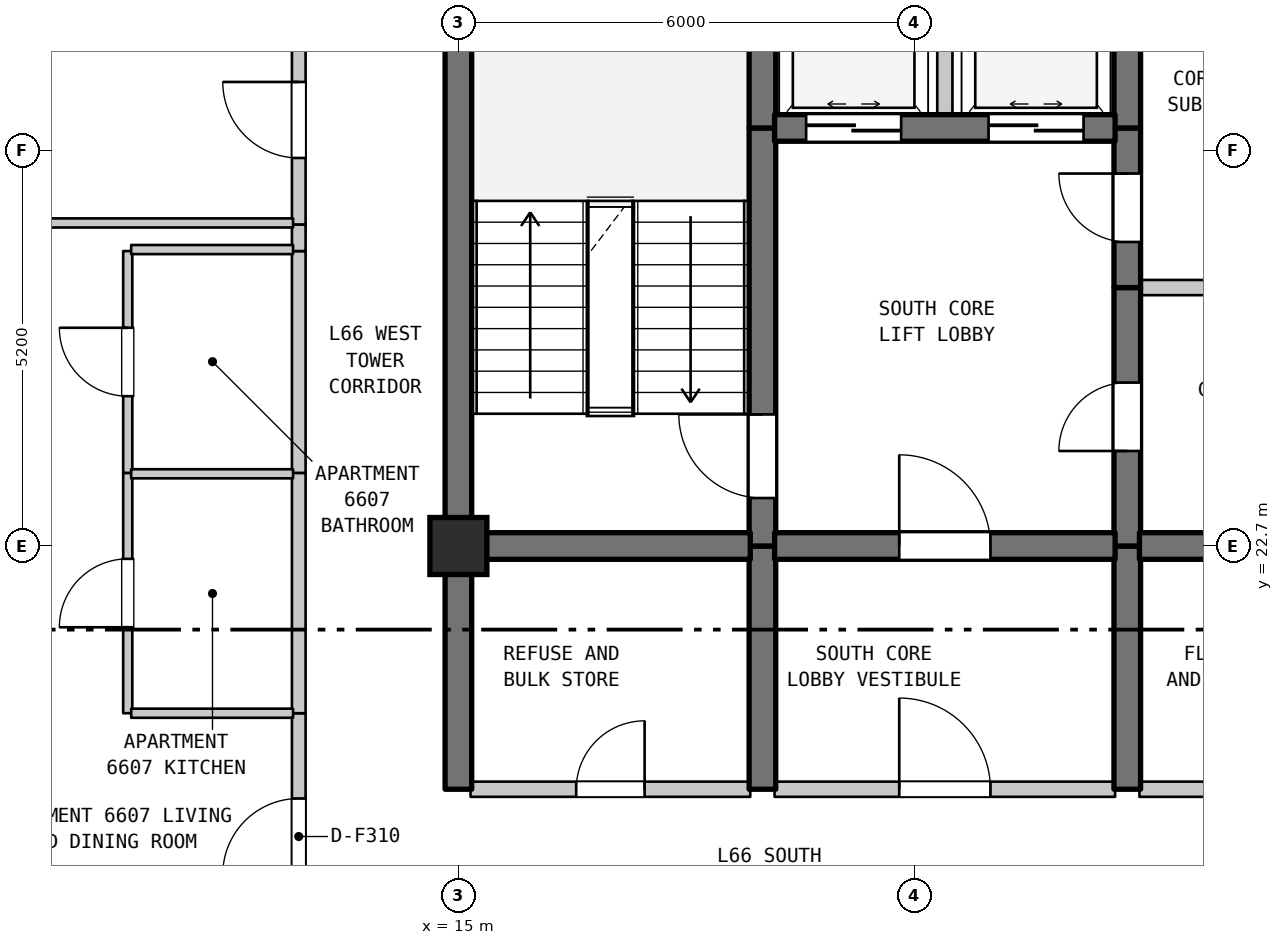
"""IFC4 building model, lengths in metres.
Left out: names, types, materials, properties, quantities, classifications, styles, units other than length and angle.
Written with IfcOpenShell. Run it as: python <this file> out.ifc"""

import sys

from ifc_helpers import new_model, si_unit, direction, frame, frame_2d, origin, origin_2d, place, context, subcontext, project, spatial, rectangle, extrude, element, fill, save


model = new_model("IFC4")
c1 = context("Model", 3, precision=1e-05, world=origin(), true_north=direction((0.0, 1.0)))
c2 = subcontext(c1, "Body", "Model", "MODEL_VIEW")
j1 = project(units=[si_unit("LENGTHUNIT", "METRE"), si_unit("PLANEANGLEUNIT", "RADIAN")], contexts=[c1])
p1 = place(None, origin())
s1 = spatial("IfcSite", under=j1, at=p1, CompositionType="ELEMENT")
p2 = place(p1, origin())
s2 = spatial("IfcBuilding", under=s1, at=p2, CompositionType="ELEMENT")
p3 = place(p2, frame((0.0, 0.0, 265.8)))
s3 = spatial("IfcBuildingStorey", under=s2, at=p3, CompositionType="ELEMENT", Elevation=265.8)
p4 = place(p3, frame((15.0, 22.7, 0.0), z_axis=(0.0, 0.0, 1.0), x_axis=(1.0, 0.0, 0.0)))
e1 = element("IfcColumn", 1, at=p4, inside=s3, PredefinedType="COLUMN", context=c2, shape_type="SweptSolid", body=[
    extrude(rectangle(XDim=0.75, YDim=0.75, at=origin_2d()), origin(), (0.0, 0.0, 1.0), 3.7),
])
p5 = place(p3, frame((10.65, 20.5, 0.0), z_axis=(0.0, 0.0, 1.0), x_axis=(0.0, 1.0, 0.0)))
e2 = element("IfcWall", 2, at=p5, inside=s3, PredefinedType="PARTITIONING", context=c2, shape_type="SweptSolid", body=[
    extrude(rectangle(XDim=3.162, YDim=0.12, at=frame_2d((1.581, 0.0))), origin(), (0.0, 0.0, 1.0), 3.39),
])
p6 = place(p5, frame((1.131, 0.0, 0.0)))
e3 = element("IfcOpeningElement", 3, at=p6, cuts=e2, PredefinedType="OPENING", context=c2, shape_type="SweptSolid", body=[
    extrude(rectangle(XDim=0.9, YDim=2.15, at=frame_2d((0.45, 1.075))), frame((0.0, 0.07, 0.0), z_axis=(0.0, -1.0, 0.0), x_axis=(1.0, 0.0, 0.0)), (0.0, 0.0, 1.0), 0.14),
])
p7 = place(p3, frame((10.65, 23.662, 0.0), z_axis=(0.0, 0.0, 1.0), x_axis=(0.0, 1.0, 0.0)))
e4 = element("IfcWall", 4, at=p7, inside=s3, PredefinedType="PARTITIONING", context=c2, shape_type="SweptSolid", body=[
    extrude(rectangle(XDim=2.918, YDim=0.12, at=frame_2d((1.459, 0.0))), origin(), (0.0, 0.0, 1.0), 3.39),
])
p8 = place(p7, frame((1.009, 0.0, 0.0)))
e5 = element("IfcOpeningElement", 5, at=p8, cuts=e4, PredefinedType="OPENING", context=c2, shape_type="SweptSolid", body=[
    extrude(rectangle(XDim=0.9, YDim=2.1, at=frame_2d((0.45, 1.05))), frame((0.0, 0.07, 0.0), z_axis=(0.0, -1.0, 0.0), x_axis=(1.0, 0.0, 0.0)), (0.0, 0.0, 1.0), 0.14),
])
p9 = place(p3, frame((12.9, 17.4, 0.0), z_axis=(0.0, 0.0, 1.0), x_axis=(0.0, 1.0, 0.0)))
e6 = element("IfcWall", 6, at=p9, inside=s3, PredefinedType="STANDARD", context=c2, shape_type="SweptSolid", body=[
    extrude(rectangle(XDim=3.1, YDim=0.18, at=frame_2d((1.55, 0.0))), origin(), (0.0, 0.0, 1.0), 3.39),
])
p10 = place(p9, frame((0.978, 0.0, 0.0)))
e7 = element("IfcOpeningElement", 7, at=p10, cuts=e6, PredefinedType="OPENING", context=c2, shape_type="SweptSolid", body=[
    extrude(rectangle(XDim=1.0, YDim=2.15, at=frame_2d((0.5, 1.075))), frame((0.0, 0.1, 0.0), z_axis=(0.0, -1.0, 0.0), x_axis=(1.0, 0.0, 0.0)), (0.0, 0.0, 1.0), 0.2),
])
p11 = place(p3, frame((12.9, 20.5, 0.0), z_axis=(0.0, 0.0, 1.0), x_axis=(0.0, 1.0, 0.0)))
e8 = element("IfcWall", 8, at=p11, inside=s3, PredefinedType="STANDARD", context=c2, shape_type="SweptSolid", body=[
    extrude(rectangle(XDim=3.162, YDim=0.18, at=frame_2d((1.581, 0.0))), origin(), (0.0, 0.0, 1.0), 3.39),
])
p12 = place(p3, frame((12.9, 23.662, 0.0), z_axis=(0.0, 0.0, 1.0), x_axis=(0.0, 1.0, 0.0)))
e9 = element("IfcWall", 9, at=p12, inside=s3, PredefinedType="STANDARD", context=c2, shape_type="SweptSolid", body=[
    extrude(rectangle(XDim=2.918, YDim=0.18, at=frame_2d((1.459, 0.0))), origin(), (0.0, 0.0, 1.0), 3.39),
])
p13 = place(p3, frame((12.9, 26.58, 0.0), z_axis=(0.0, 0.0, 1.0), x_axis=(0.0, 1.0, 0.0)))
e10 = element("IfcWall", 10, at=p13, inside=s3, PredefinedType="STANDARD", context=c2, shape_type="SweptSolid", body=[
    extrude(rectangle(XDim=0.35, YDim=0.18, at=frame_2d((0.175, 0.0))), origin(), (0.0, 0.0, 1.0), 3.39),
])
p14 = place(p3, frame((12.9, 26.93, 0.0), z_axis=(0.0, 0.0, 1.0), x_axis=(0.0, 1.0, 0.0)))
e11 = element("IfcWall", 11, at=p14, inside=s3, PredefinedType="STANDARD", context=c2, shape_type="SweptSolid", body=[
    extrude(rectangle(XDim=2.75, YDim=0.18, at=frame_2d((1.375, 0.0))), origin(), (0.0, 0.0, 1.0), 3.39),
])
p15 = place(p14, frame((0.875, 0.0, 0.0)))
e12 = element("IfcOpeningElement", 12, at=p15, cuts=e11, PredefinedType="OPENING", context=c2, shape_type="SweptSolid", body=[
    extrude(rectangle(XDim=1.0, YDim=2.15, at=frame_2d((0.5, 1.075))), frame((0.0, 0.1, 0.0), z_axis=(0.0, -1.0, 0.0), x_axis=(1.0, 0.0, 0.0)), (0.0, 0.0, 1.0), 0.2),
])
p16 = place(p3, frame((15.0, 19.5, 0.0), z_axis=(0.0, 0.0, 1.0), x_axis=(0.0, 1.0, 0.0)))
e13 = element("IfcWall", 13, at=p16, inside=s3, PredefinedType="SHEAR", context=c2, shape_type="SweptSolid", body=[
    extrude(rectangle(XDim=3.2, YDim=0.35, at=frame_2d((1.6, 0.0))), origin(), (0.0, 0.0, 1.0), 3.39),
])
p17 = place(p3, frame((15.0, 22.7, 0.0), z_axis=(0.0, 0.0, 1.0), x_axis=(0.0, 1.0, 0.0)))
e14 = element("IfcWall", 14, at=p17, inside=s3, PredefinedType="SHEAR", context=c2, shape_type="SweptSolid", body=[
    extrude(rectangle(XDim=6.8, YDim=0.35, at=frame_2d((3.4, 0.0))), origin(), (0.0, 0.0, 1.0), 3.39),
])
p18 = place(p3, frame((19.0, 19.5, 0.0), z_axis=(0.0, 0.0, 1.0), x_axis=(0.0, 1.0, 0.0)))
e15 = element("IfcWall", 15, at=p18, inside=s3, PredefinedType="SHEAR", context=c2, shape_type="SweptSolid", body=[
    extrude(rectangle(XDim=3.2, YDim=0.35, at=frame_2d((1.6, 0.0))), origin(), (0.0, 0.0, 1.0), 3.39),
])
p19 = place(p3, frame((19.0, 22.7, 0.0), z_axis=(0.0, 0.0, 1.0), x_axis=(0.0, 1.0, 0.0)))
e16 = element("IfcWall", 16, at=p19, inside=s3, PredefinedType="SHEAR", context=c2, shape_type="SweptSolid", body=[
    extrude(rectangle(XDim=5.5, YDim=0.35, at=frame_2d((2.75, 0.0))), origin(), (0.0, 0.0, 1.0), 3.39),
])
p20 = place(p19, frame((0.631, 0.0, 0.0)))
e17 = element("IfcOpeningElement", 17, at=p20, cuts=e16, PredefinedType="OPENING", context=c2, shape_type="SweptSolid", body=[
    extrude(rectangle(XDim=1.1, YDim=2.15, at=frame_2d((0.55, 1.075))), frame((0.0, 0.185, 0.0), z_axis=(0.0, -1.0, 0.0), x_axis=(1.0, 0.0, 0.0)), (0.0, 0.0, 1.0), 0.37),
])
p21 = place(p3, frame((19.0, 28.2, 0.0), z_axis=(0.0, 0.0, 1.0), x_axis=(0.0, 1.0, 0.0)))
e18 = element("IfcWall", 18, at=p21, inside=s3, PredefinedType="SHEAR", context=c2, shape_type="SweptSolid", body=[
    extrude(rectangle(XDim=1.3, YDim=0.35, at=frame_2d((0.65, 0.0))), origin(), (0.0, 0.0, 1.0), 3.39),
])
p22 = place(p3, frame((21.4, 28.2, 0.0), z_axis=(0.0, 0.0, 1.0), x_axis=(0.0, 1.0, 0.0)))
e19 = element("IfcWall", 19, at=p22, inside=s3, PredefinedType="STANDARD", context=c2, shape_type="SweptSolid", body=[
    extrude(rectangle(XDim=2.6, YDim=0.2, at=frame_2d((1.3, 0.0))), origin(), (0.0, 0.0, 1.0), 3.39),
])
p23 = place(p3, frame((23.8, 19.5, 0.0), z_axis=(0.0, 0.0, 1.0), x_axis=(0.0, 1.0, 0.0)))
e20 = element("IfcWall", 20, at=p23, inside=s3, PredefinedType="SHEAR", context=c2, shape_type="SweptSolid", body=[
    extrude(rectangle(XDim=3.2, YDim=0.35, at=frame_2d((1.6, 0.0))), origin(), (0.0, 0.0, 1.0), 3.39),
])
p24 = place(p3, frame((23.8, 22.7, 0.0), z_axis=(0.0, 0.0, 1.0), x_axis=(0.0, 1.0, 0.0)))
e21 = element("IfcWall", 21, at=p24, inside=s3, PredefinedType="SHEAR", context=c2, shape_type="SweptSolid", body=[
    extrude(rectangle(XDim=3.4, YDim=0.35, at=frame_2d((1.7, 0.0))), origin(), (0.0, 0.0, 1.0), 3.39),
])
p25 = place(p24, frame((1.25, 0.0, 0.0)))
e22 = element("IfcOpeningElement", 22, at=p25, cuts=e21, PredefinedType="OPENING", context=c2, shape_type="SweptSolid", body=[
    extrude(rectangle(XDim=0.9, YDim=2.15, at=frame_2d((0.45, 1.075))), frame((0.0, 0.185, 0.0), z_axis=(0.0, -1.0, 0.0), x_axis=(1.0, 0.0, 0.0)), (0.0, 0.0, 1.0), 0.37),
])
p26 = place(p3, frame((23.8, 26.1, 0.0), z_axis=(0.0, 0.0, 1.0), x_axis=(0.0, 1.0, 0.0)))
e23 = element("IfcWall", 23, at=p26, inside=s3, PredefinedType="SHEAR", context=c2, shape_type="SweptSolid", body=[
    extrude(rectangle(XDim=2.1, YDim=0.35, at=frame_2d((1.05, 0.0))), origin(), (0.0, 0.0, 1.0), 3.39),
])
p27 = place(p26, frame((0.6, 0.0, 0.0)))
e24 = element("IfcOpeningElement", 24, at=p27, cuts=e23, PredefinedType="OPENING", context=c2, shape_type="SweptSolid", body=[
    extrude(rectangle(XDim=0.9, YDim=2.15, at=frame_2d((0.45, 1.075))), frame((0.0, 0.185, 0.0), z_axis=(0.0, -1.0, 0.0), x_axis=(1.0, 0.0, 0.0)), (0.0, 0.0, 1.0), 0.37),
])
p28 = place(p3, frame((23.8, 28.2, 0.0), z_axis=(0.0, 0.0, 1.0), x_axis=(0.0, 1.0, 0.0)))
e25 = element("IfcWall", 25, at=p28, inside=s3, PredefinedType="SHEAR", context=c2, shape_type="SweptSolid", body=[
    extrude(rectangle(XDim=2.6, YDim=0.35, at=frame_2d((1.3, 0.0))), origin(), (0.0, 0.0, 1.0), 3.39),
])
p29 = place(p3, frame((15.16, 19.5, 0.0), z_axis=(0.0, 0.0, 1.0), x_axis=(1.0, 0.0, 0.0)))
e26 = element("IfcWall", 26, at=p29, inside=s3, PredefinedType="STANDARD", context=c2, shape_type="SweptSolid", body=[
    extrude(rectangle(XDim=3.68, YDim=0.2, at=frame_2d((1.84, 0.0))), origin(), (0.0, 0.0, 1.0), 3.39),
])
p30 = place(p29, frame((1.39, 0.0, 0.0)))
e27 = element("IfcOpeningElement", 27, at=p30, cuts=e26, PredefinedType="OPENING", context=c2, shape_type="SweptSolid", body=[
    extrude(rectangle(XDim=0.9, YDim=2.15, at=frame_2d((0.45, 1.075))), frame((0.0, 0.11, 0.0), z_axis=(0.0, -1.0, 0.0), x_axis=(1.0, 0.0, 0.0)), (0.0, 0.0, 1.0), 0.22),
])
p31 = place(p3, frame((19.16, 19.5, 0.0), z_axis=(0.0, 0.0, 1.0), x_axis=(1.0, 0.0, 0.0)))
e28 = element("IfcWall", 28, at=p31, inside=s3, PredefinedType="STANDARD", context=c2, shape_type="SweptSolid", body=[
    extrude(rectangle(XDim=4.48, YDim=0.2, at=frame_2d((2.24, 0.0))), origin(), (0.0, 0.0, 1.0), 3.39),
])
p32 = place(p31, frame((1.64, 0.0, 0.0)))
e29 = element("IfcOpeningElement", 29, at=p32, cuts=e28, PredefinedType="OPENING", context=c2, shape_type="SweptSolid", body=[
    extrude(rectangle(XDim=1.2, YDim=2.2, at=frame_2d((0.6, 1.1))), frame((0.0, 0.11, 0.0), z_axis=(0.0, -1.0, 0.0), x_axis=(1.0, 0.0, 0.0)), (0.0, 0.0, 1.0), 0.22),
])
p33 = place(p3, frame((23.96, 19.5, 0.0), z_axis=(0.0, 0.0, 1.0), x_axis=(1.0, 0.0, 0.0)))
e30 = element("IfcWall", 30, at=p33, inside=s3, PredefinedType="STANDARD", context=c2, shape_type="SweptSolid", body=[
    extrude(rectangle(XDim=3.155, YDim=0.2, at=frame_2d((1.578, 0.0))), origin(), (0.0, 0.0, 1.0), 3.39),
])
p34 = place(p33, frame((0.991, 0.0, 0.0)))
e31 = element("IfcOpeningElement", 31, at=p34, cuts=e30, PredefinedType="OPENING", context=c2, shape_type="SweptSolid", body=[
    extrude(rectangle(XDim=0.95, YDim=2.15, at=frame_2d((0.475, 1.075))), frame((0.0, 0.11, 0.0), z_axis=(0.0, -1.0, 0.0), x_axis=(1.0, 0.0, 0.0)), (0.0, 0.0, 1.0), 0.22),
])
p35 = place(p3, frame((10.695, 20.5, 0.0), z_axis=(0.0, 0.0, 1.0), x_axis=(1.0, 0.0, 0.0)))
e32 = element("IfcWall", 32, at=p35, inside=s3, PredefinedType="PARTITIONING", context=c2, shape_type="SweptSolid", body=[
    extrude(rectangle(XDim=2.13, YDim=0.12, at=frame_2d((1.065, 0.0))), origin(), (0.0, 0.0, 1.0), 3.39),
])
p36 = place(p3, frame((15.16, 22.7, 0.0), z_axis=(0.0, 0.0, 1.0), x_axis=(1.0, 0.0, 0.0)))
e33 = element("IfcWall", 33, at=p36, inside=s3, PredefinedType="SHEAR", context=c2, shape_type="SweptSolid", body=[
    extrude(rectangle(XDim=3.68, YDim=0.35, at=frame_2d((1.84, 0.0))), origin(), (0.0, 0.0, 1.0), 3.39),
])
p37 = place(p3, frame((19.16, 22.7, 0.0), z_axis=(0.0, 0.0, 1.0), x_axis=(1.0, 0.0, 0.0)))
e34 = element("IfcWall", 34, at=p37, inside=s3, PredefinedType="SHEAR", context=c2, shape_type="SweptSolid", body=[
    extrude(rectangle(XDim=4.48, YDim=0.35, at=frame_2d((2.24, 0.0))), origin(), (0.0, 0.0, 1.0), 3.39),
])
p38 = place(p37, frame((1.64, 0.0, 0.0)))
e35 = element("IfcOpeningElement", 35, at=p38, cuts=e34, PredefinedType="OPENING", context=c2, shape_type="SweptSolid", body=[
    extrude(rectangle(XDim=1.2, YDim=2.2, at=frame_2d((0.6, 1.1))), frame((0.0, 0.185, 0.0), z_axis=(0.0, -1.0, 0.0), x_axis=(1.0, 0.0, 0.0)), (0.0, 0.0, 1.0), 0.37),
])
p39 = place(p3, frame((23.96, 22.7, 0.0), z_axis=(0.0, 0.0, 1.0), x_axis=(1.0, 0.0, 0.0)))
e36 = element("IfcWall", 36, at=p39, inside=s3, PredefinedType="SHEAR", context=c2, shape_type="SweptSolid", body=[
    extrude(rectangle(XDim=3.155, YDim=0.35, at=frame_2d((1.578, 0.0))), origin(), (0.0, 0.0, 1.0), 3.39),
])
p40 = place(p3, frame((10.695, 23.65, 0.0), z_axis=(0.0, 0.0, 1.0), x_axis=(1.0, 0.0, 0.0)))
e37 = element("IfcWall", 37, at=p40, inside=s3, PredefinedType="PARTITIONING", context=c2, shape_type="SweptSolid", body=[
    extrude(rectangle(XDim=2.13, YDim=0.12, at=frame_2d((1.065, 0.0))), origin(), (0.0, 0.0, 1.0), 3.39),
])
p41 = place(p3, frame((23.96, 26.1, 0.0), z_axis=(0.0, 0.0, 1.0), x_axis=(1.0, 0.0, 0.0)))
e38 = element("IfcWall", 38, at=p41, inside=s3, PredefinedType="STANDARD", context=c2, shape_type="SweptSolid", body=[
    extrude(rectangle(XDim=3.18, YDim=0.2, at=frame_2d((1.59, 0.0))), origin(), (0.0, 0.0, 1.0), 3.39),
])
p42 = place(p3, frame((10.695, 26.6, 0.0), z_axis=(0.0, 0.0, 1.0), x_axis=(1.0, 0.0, 0.0)))
e39 = element("IfcWall", 39, at=p42, inside=s3, PredefinedType="PARTITIONING", context=c2, shape_type="SweptSolid", body=[
    extrude(rectangle(XDim=2.13, YDim=0.12, at=frame_2d((1.065, 0.0))), origin(), (0.0, 0.0, 1.0), 3.39),
])
p43 = place(p3, frame((9.175, 26.95, 0.0), z_axis=(0.0, 0.0, 1.0), x_axis=(1.0, 0.0, 0.0)))
e40 = element("IfcWall", 40, at=p43, inside=s3, PredefinedType="PARTITIONING", context=c2, shape_type="SweptSolid", body=[
    extrude(rectangle(XDim=3.65, YDim=0.12, at=frame_2d((1.825, 0.0))), origin(), (0.0, 0.0, 1.0), 3.39),
])
p44 = place(p3, frame((19.16, 28.2, 0.0), z_axis=(0.0, 0.0, 1.0), x_axis=(1.0, 0.0, 0.0)))
e41 = element("IfcWall", 41, at=p44, inside=s3, PredefinedType="SHEAR", context=c2, shape_type="SweptSolid", body=[
    extrude(rectangle(XDim=4.48, YDim=0.35, at=frame_2d((2.24, 0.0))), origin(), (0.0, 0.0, 1.0), 3.39),
])
p45 = place(p44, frame((0.415, 0.0, 0.0)))
e42 = element("IfcOpeningElement", 42, at=p45, cuts=e41, PredefinedType="OPENING", context=c2, shape_type="SweptSolid", body=[
    extrude(rectangle(XDim=1.25, YDim=2.2, at=frame_2d((0.625, 1.1))), frame((0.0, 0.185, 0.0), z_axis=(0.0, -1.0, 0.0), x_axis=(1.0, 0.0, 0.0)), (0.0, 0.0, 1.0), 0.37),
])
p46 = place(p44, frame((2.815, 0.0, 0.0)))
e43 = element("IfcOpeningElement", 43, at=p46, cuts=e41, PredefinedType="OPENING", context=c2, shape_type="SweptSolid", body=[
    extrude(rectangle(XDim=1.25, YDim=2.2, at=frame_2d((0.625, 1.1))), frame((0.0, 0.185, 0.0), z_axis=(0.0, -1.0, 0.0), x_axis=(1.0, 0.0, 0.0)), (0.0, 0.0, 1.0), 0.37),
])
p47 = place(p6, origin())
e44 = element("IfcDoor", 44, at=p47, inside=s3, OperationType="SINGLE_SWING_LEFT", PredefinedType="DOOR", context=c2, shape_type="SweptSolid", body=[
    extrude(rectangle(XDim=0.9, YDim=2.15, at=frame_2d((0.45, 1.075))), frame((0.0, 0.025, 0.0), z_axis=(0.0, -1.0, 0.0), x_axis=(1.0, 0.0, 0.0)), (0.0, 0.0, 1.0), 0.05),
])
fill(e3, e44)
p48 = place(p8, origin())
e45 = element("IfcDoor", 45, at=p48, inside=s3, OperationType="SINGLE_SWING_RIGHT", PredefinedType="DOOR", context=c2, shape_type="SweptSolid", body=[
    extrude(rectangle(XDim=0.9, YDim=2.1, at=frame_2d((0.45, 1.05))), frame((0.0, 0.025, 0.0), z_axis=(0.0, -1.0, 0.0), x_axis=(1.0, 0.0, 0.0)), (0.0, 0.0, 1.0), 0.05),
])
fill(e5, e45)
p49 = place(p10, origin())
e46 = element("IfcDoor", 46, at=p49, inside=s3, OperationType="SINGLE_SWING_LEFT", PredefinedType="DOOR", context=c2, shape_type="SweptSolid", body=[
    extrude(rectangle(XDim=1.0, YDim=2.15, at=frame_2d((0.5, 1.075))), frame((0.0, 0.025, 0.0), z_axis=(0.0, -1.0, 0.0), x_axis=(1.0, 0.0, 0.0)), (0.0, 0.0, 1.0), 0.05),
])
fill(e7, e46)
p50 = place(p15, origin())
e47 = element("IfcDoor", 47, at=p50, inside=s3, OperationType="SINGLE_SWING_RIGHT", PredefinedType="DOOR", context=c2, shape_type="SweptSolid", body=[
    extrude(rectangle(XDim=1.0, YDim=2.15, at=frame_2d((0.5, 1.075))), frame((0.0, 0.025, 0.0), z_axis=(0.0, -1.0, 0.0), x_axis=(1.0, 0.0, 0.0)), (0.0, 0.0, 1.0), 0.05),
])
fill(e12, e47)
p51 = place(p20, origin())
e48 = element("IfcDoor", 48, at=p51, inside=s3, OperationType="SINGLE_SWING_RIGHT", PredefinedType="DOOR", context=c2, shape_type="SweptSolid", body=[
    extrude(rectangle(XDim=1.1, YDim=2.15, at=frame_2d((0.55, 1.075))), frame((0.0, 0.025, 0.0), z_axis=(0.0, -1.0, 0.0), x_axis=(1.0, 0.0, 0.0)), (0.0, 0.0, 1.0), 0.05),
])
fill(e17, e48)
p52 = place(p25, origin())
e49 = element("IfcDoor", 49, at=p52, inside=s3, OperationType="SINGLE_SWING_LEFT", PredefinedType="DOOR", context=c2, shape_type="SweptSolid", body=[
    extrude(rectangle(XDim=0.9, YDim=2.15, at=frame_2d((0.45, 1.075))), frame((0.0, 0.025, 0.0), z_axis=(0.0, -1.0, 0.0), x_axis=(1.0, 0.0, 0.0)), (0.0, 0.0, 1.0), 0.05),
])
fill(e22, e49)
p53 = place(p27, origin())
e50 = element("IfcDoor", 50, at=p53, inside=s3, OperationType="SINGLE_SWING_RIGHT", PredefinedType="DOOR", context=c2, shape_type="SweptSolid", body=[
    extrude(rectangle(XDim=0.9, YDim=2.15, at=frame_2d((0.45, 1.075))), frame((0.0, 0.025, 0.0), z_axis=(0.0, -1.0, 0.0), x_axis=(1.0, 0.0, 0.0)), (0.0, 0.0, 1.0), 0.05),
])
fill(e24, e50)
p54 = place(p30, origin())
e51 = element("IfcDoor", 51, at=p54, inside=s3, OperationType="SINGLE_SWING_RIGHT", PredefinedType="DOOR", context=c2, shape_type="SweptSolid", body=[
    extrude(rectangle(XDim=0.9, YDim=2.15, at=frame_2d((0.45, 1.075))), frame((0.0, 0.025, 0.0), z_axis=(0.0, -1.0, 0.0), x_axis=(1.0, 0.0, 0.0)), (0.0, 0.0, 1.0), 0.05),
])
fill(e27, e51)
p55 = place(p32, origin())
e52 = element("IfcDoor", 52, at=p55, inside=s3, OperationType="SINGLE_SWING_LEFT", PredefinedType="DOOR", context=c2, shape_type="SweptSolid", body=[
    extrude(rectangle(XDim=1.2, YDim=2.2, at=frame_2d((0.6, 1.1))), frame((0.0, 0.025, 0.0), z_axis=(0.0, -1.0, 0.0), x_axis=(1.0, 0.0, 0.0)), (0.0, 0.0, 1.0), 0.05),
])
fill(e29, e52)
p56 = place(p38, origin())
e53 = element("IfcDoor", 53, at=p56, inside=s3, OperationType="SINGLE_SWING_LEFT", PredefinedType="DOOR", context=c2, shape_type="SweptSolid", body=[
    extrude(rectangle(XDim=1.2, YDim=2.2, at=frame_2d((0.6, 1.1))), frame((0.0, 0.025, 0.0), z_axis=(0.0, -1.0, 0.0), x_axis=(1.0, 0.0, 0.0)), (0.0, 0.0, 1.0), 0.05),
])
fill(e35, e53)
p57 = place(p45, origin())
e54 = element("IfcDoor", 54, at=p57, inside=s3, OperationType="DOUBLE_DOOR_SLIDING", PredefinedType="DOOR", context=c2, shape_type="SweptSolid", body=[
    extrude(rectangle(XDim=1.25, YDim=2.2, at=frame_2d((0.625, 1.1))), frame((0.0, 0.025, 0.0), z_axis=(0.0, -1.0, 0.0), x_axis=(1.0, 0.0, 0.0)), (0.0, 0.0, 1.0), 0.05),
])
fill(e42, e54)
p58 = place(p46, origin())
e55 = element("IfcDoor", 55, at=p58, inside=s3, OperationType="DOUBLE_DOOR_SLIDING", PredefinedType="DOOR", context=c2, shape_type="SweptSolid", body=[
    extrude(rectangle(XDim=1.25, YDim=2.2, at=frame_2d((0.625, 1.1))), frame((0.0, 0.025, 0.0), z_axis=(0.0, -1.0, 0.0), x_axis=(1.0, 0.0, 0.0)), (0.0, 0.0, 1.0), 0.05),
])
fill(e43, e55)
save(model, sys.argv[1])
